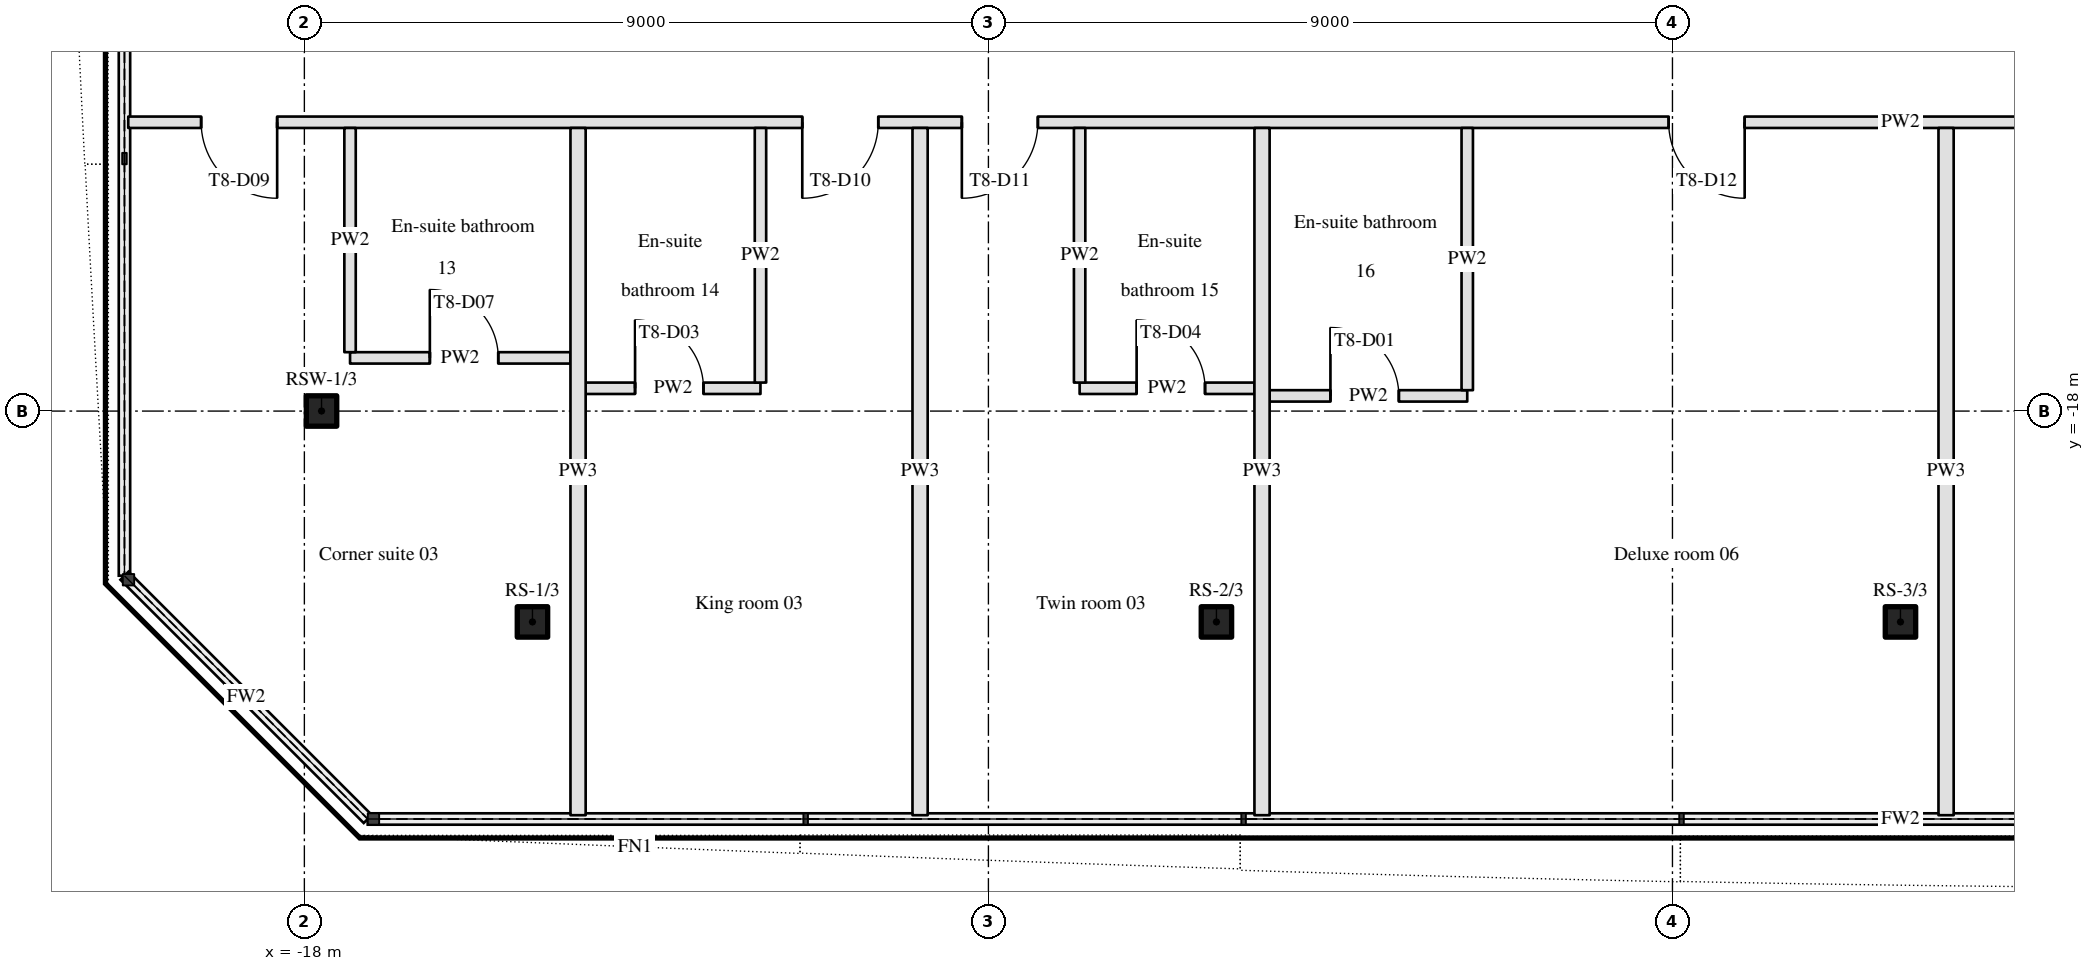
"""IFC4 building model, lengths in metres.
Left out: names, types, materials, properties, quantities, classifications, styles, units other than length and angle.
Written with IfcOpenShell. Run it as: python <this file> out.ifc"""

import sys

from ifc_helpers import new_model, si_unit, direction, frame, frame_2d, origin, origin_2d, place, context, subcontext, project, spatial, rectangle, hollow_rectangle, extrude, element, fill, save


model = new_model("IFC4")
c1 = context("Model", 3, precision=1e-05, world=origin(), true_north=direction((0.0, 1.0)))
c2 = subcontext(c1, "Body", "Model", "MODEL_VIEW")
j1 = project(units=[si_unit("LENGTHUNIT", "METRE"), si_unit("PLANEANGLEUNIT", "RADIAN")], contexts=[c1])
p1 = place(None, origin())
s1 = spatial("IfcSite", under=j1, at=p1, CompositionType="ELEMENT")
p2 = place(p1, origin())
s2 = spatial("IfcBuilding", under=s1, at=p2, CompositionType="ELEMENT")
p3 = place(p2, frame((0.0, 0.0, 121.5)))
s3 = spatial("IfcBuildingStorey", under=s2, at=p3, CompositionType="ELEMENT", Elevation=121.5)
for number, where, z_axis, x_axis in (
    (1, (-14.999, -20.774, 0.0), (0.0, 0.0, 1.0), (1.0, 0.0, 0.0)),
    (2, (-6.0, -20.774, 0.0), (0.0, 0.0, 1.0), (1.0, 0.0, 0.0)),
    (3, (3.0, -20.774, 0.0), (0.0, 0.0, 1.0), (1.0, 0.0, 0.0)),
    (4, (-17.774, -17.999, 0.0), (0.0, 0.0, 1.0), (1.0, 0.0, 0.0)),
):
    element("IfcColumn", number, at=place(p3, frame(where, z_axis=z_axis, x_axis=x_axis)), inside=s3, PredefinedType="COLUMN", context=c2, shape_type="SweptSolid", body=[
        extrude(hollow_rectangle(XDim=0.4, YDim=0.4, WallThickness=0.02, InnerFilletRadius=0.03, OuterFilletRadius=0.05, at=origin_2d()), origin(), (0.0, 0.0, 1.0), 3.4),
    ])
p4 = place(p3, frame((-5.3, -17.8, 0.0), z_axis=(0.0, 0.0, 1.0), x_axis=(1.0, 0.0, 0.0)))
e5 = element("IfcWall", 5, at=p4, inside=s3, PredefinedType="PARTITIONING", context=c2, shape_type="SweptSolid", body=[
    extrude(rectangle(XDim=2.6, YDim=0.15, at=frame_2d((1.3, 0.0))), origin(), (0.0, 0.0, 1.0), 2.46),
])
p5 = place(p4, frame((0.8, 0.0, 0.0)))
e6 = element("IfcOpeningElement", 6, at=p5, cuts=e5, PredefinedType="OPENING", context=c2, shape_type="SweptSolid", body=[
    extrude(rectangle(XDim=0.9, YDim=2.1, at=frame_2d((0.45, 1.05))), frame((0.0, 0.085, 0.0), z_axis=(0.0, -1.0, 0.0), x_axis=(1.0, 0.0, 0.0)), (0.0, 0.0, 1.0), 0.17),
])
p6 = place(p3, frame((-14.299, -17.7, 0.0), z_axis=(0.0, 0.0, 1.0), x_axis=(1.0, 0.0, 0.0)))
e7 = element("IfcWall", 7, at=p6, inside=s3, PredefinedType="PARTITIONING", context=c2, shape_type="SweptSolid", body=[
    extrude(rectangle(XDim=2.3, YDim=0.15, at=frame_2d((1.15, 0.0))), origin(), (0.0, 0.0, 1.0), 2.46),
])
p7 = place(p6, frame((0.65, 0.0, 0.0)))
e8 = element("IfcOpeningElement", 8, at=p7, cuts=e7, PredefinedType="OPENING", context=c2, shape_type="SweptSolid", body=[
    extrude(rectangle(XDim=0.9, YDim=2.1, at=frame_2d((0.45, 1.05))), frame((0.0, 0.085, 0.0), z_axis=(0.0, -1.0, 0.0), x_axis=(1.0, 0.0, 0.0)), (0.0, 0.0, 1.0), 0.17),
])
p8 = place(p3, frame((-7.8, -17.7, 0.0), z_axis=(0.0, 0.0, 1.0), x_axis=(1.0, 0.0, 0.0)))
e9 = element("IfcWall", 9, at=p8, inside=s3, PredefinedType="PARTITIONING", context=c2, shape_type="SweptSolid", body=[
    extrude(rectangle(XDim=2.3, YDim=0.15, at=frame_2d((1.15, 0.0))), origin(), (0.0, 0.0, 1.0), 2.46),
])
p9 = place(p8, frame((0.75, 0.0, 0.0)))
e10 = element("IfcOpeningElement", 10, at=p9, cuts=e9, PredefinedType="OPENING", context=c2, shape_type="SweptSolid", body=[
    extrude(rectangle(XDim=0.9, YDim=2.1, at=frame_2d((0.45, 1.05))), frame((0.0, 0.085, 0.0), z_axis=(0.0, -1.0, 0.0), x_axis=(1.0, 0.0, 0.0)), (0.0, 0.0, 1.0), 0.17),
])
p10 = place(p3, frame((-17.399, -17.3, 0.0), z_axis=(0.0, 0.0, 1.0), x_axis=(1.0, 0.0, 0.0)))
e11 = element("IfcWall", 11, at=p10, inside=s3, PredefinedType="PARTITIONING", context=c2, shape_type="SweptSolid", body=[
    extrude(rectangle(XDim=2.9, YDim=0.15, at=frame_2d((1.45, 0.0))), origin(), (0.0, 0.0, 1.0), 2.46),
])
p11 = place(p10, frame((1.05, 0.0, 0.0)))
e12 = element("IfcOpeningElement", 12, at=p11, cuts=e11, PredefinedType="OPENING", context=c2, shape_type="SweptSolid", body=[
    extrude(rectangle(XDim=0.9, YDim=2.1, at=frame_2d((0.45, 1.05))), frame((0.0, 0.085, 0.0), z_axis=(0.0, -1.0, 0.0), x_axis=(1.0, 0.0, 0.0)), (0.0, 0.0, 1.0), 0.17),
])
p12 = place(p3, frame((26.317, -14.2, 0.0), z_axis=(0.0, 0.0, 1.0), x_axis=(-1.0, 0.0, 0.0)))
e13 = element("IfcWall", 13, at=p12, inside=s3, PredefinedType="PARTITIONING", context=c2, shape_type="SweptSolid", body=[
    extrude(rectangle(XDim=46.634, YDim=0.15, at=frame_2d((23.317, 0.0))), origin(), (0.0, 0.0, 1.0), 2.46),
])
p13 = place(p12, frame((44.675, 0.0, 0.0)))
e14 = element("IfcOpeningElement", 14, at=p13, cuts=e13, PredefinedType="OPENING", context=c2, shape_type="SweptSolid", body=[
    extrude(rectangle(XDim=1.0, YDim=2.1, at=frame_2d((0.5, 1.05))), frame((0.0, 0.085, 0.0), z_axis=(0.0, -1.0, 0.0), x_axis=(1.0, 0.0, 0.0)), (0.0, 0.0, 1.0), 0.17),
])
p14 = place(p12, frame((36.766, 0.0, 0.0)))
e15 = element("IfcOpeningElement", 15, at=p14, cuts=e13, PredefinedType="OPENING", context=c2, shape_type="SweptSolid", body=[
    extrude(rectangle(XDim=1.0, YDim=2.1, at=frame_2d((0.5, 1.05))), frame((0.0, 0.085, 0.0), z_axis=(0.0, -1.0, 0.0), x_axis=(1.0, 0.0, 0.0)), (0.0, 0.0, 1.0), 0.17),
])
p15 = place(p12, frame((34.667, 0.0, 0.0)))
e16 = element("IfcOpeningElement", 16, at=p15, cuts=e13, PredefinedType="OPENING", context=c2, shape_type="SweptSolid", body=[
    extrude(rectangle(XDim=1.0, YDim=2.1, at=frame_2d((0.5, 1.05))), frame((0.0, 0.085, 0.0), z_axis=(0.0, -1.0, 0.0), x_axis=(1.0, 0.0, 0.0)), (0.0, 0.0, 1.0), 0.17),
])
p16 = place(p12, frame((25.367, 0.0, 0.0)))
e17 = element("IfcOpeningElement", 17, at=p16, cuts=e13, PredefinedType="OPENING", context=c2, shape_type="SweptSolid", body=[
    extrude(rectangle(XDim=1.0, YDim=2.1, at=frame_2d((0.5, 1.05))), frame((0.0, 0.085, 0.0), z_axis=(0.0, -1.0, 0.0), x_axis=(1.0, 0.0, 0.0)), (0.0, 0.0, 1.0), 0.17),
])
p17 = place(p12, frame((19.067, 0.0, 0.0)))
e18 = element("IfcOpeningElement", 18, at=p17, cuts=e13, PredefinedType="OPENING", context=c2, shape_type="SweptSolid", body=[
    extrude(rectangle(XDim=1.0, YDim=2.1, at=frame_2d((0.5, 1.05))), frame((0.0, 0.085, 0.0), z_axis=(0.0, -1.0, 0.0), x_axis=(1.0, 0.0, 0.0)), (0.0, 0.0, 1.0), 0.17),
])
p18 = place(p12, frame((9.768, 0.0, 0.0)))
e19 = element("IfcOpeningElement", 19, at=p18, cuts=e13, PredefinedType="OPENING", context=c2, shape_type="SweptSolid", body=[
    extrude(rectangle(XDim=1.0, YDim=2.1, at=frame_2d((0.5, 1.05))), frame((0.0, 0.085, 0.0), z_axis=(0.0, -1.0, 0.0), x_axis=(1.0, 0.0, 0.0)), (0.0, 0.0, 1.0), 0.17),
])
p19 = place(p12, frame((7.668, 0.0, 0.0)))
e20 = element("IfcOpeningElement", 20, at=p19, cuts=e13, PredefinedType="OPENING", context=c2, shape_type="SweptSolid", body=[
    extrude(rectangle(XDim=1.0, YDim=2.1, at=frame_2d((0.5, 1.05))), frame((0.0, 0.085, 0.0), z_axis=(0.0, -1.0, 0.0), x_axis=(1.0, 0.0, 0.0)), (0.0, 0.0, 1.0), 0.17),
])
p20 = place(p12, frame((0.359, 0.0, 0.0)))
e21 = element("IfcOpeningElement", 21, at=p20, cuts=e13, PredefinedType="OPENING", context=c2, shape_type="SweptSolid", body=[
    extrude(rectangle(XDim=1.0, YDim=2.1, at=frame_2d((0.5, 1.05))), frame((0.0, 0.085, 0.0), z_axis=(0.0, -1.0, 0.0), x_axis=(1.0, 0.0, 0.0)), (0.0, 0.0, 1.0), 0.17),
])
p21 = place(p3, frame((-17.399, -17.225, 0.0), z_axis=(0.0, 0.0, 1.0), x_axis=(0.0, 1.0, 0.0)))
e22 = element("IfcWall", 22, at=p21, inside=s3, PredefinedType="PARTITIONING", context=c2, shape_type="SweptSolid", body=[
    extrude(rectangle(XDim=2.95, YDim=0.15, at=frame_2d((1.475, 0.0))), origin(), (0.0, 0.0, 1.0), 2.46),
])
p22 = place(p3, frame((-14.399, -23.317, 0.0), z_axis=(0.0, 0.0, 1.0), x_axis=(0.0, 1.0, 0.0)))
e23 = element("IfcWall", 23, at=p22, inside=s3, PredefinedType="PARTITIONING", context=c2, shape_type="SweptSolid", body=[
    extrude(rectangle(XDim=9.042, YDim=0.2, at=frame_2d((4.521, 0.0))), origin(), (0.0, 0.0, 1.0), 2.46),
])
p23 = place(p3, frame((-11.999, -17.625, 0.0), z_axis=(0.0, 0.0, 1.0), x_axis=(0.0, 1.0, 0.0)))
e24 = element("IfcWall", 24, at=p23, inside=s3, PredefinedType="PARTITIONING", context=c2, shape_type="SweptSolid", body=[
    extrude(rectangle(XDim=3.35, YDim=0.15, at=frame_2d((1.675, 0.0))), origin(), (0.0, 0.0, 1.0), 2.46),
])
p24 = place(p3, frame((-9.899, -23.317, 0.0), z_axis=(0.0, 0.0, 1.0), x_axis=(0.0, 1.0, 0.0)))
e25 = element("IfcWall", 25, at=p24, inside=s3, PredefinedType="PARTITIONING", context=c2, shape_type="SweptSolid", body=[
    extrude(rectangle(XDim=9.042, YDim=0.2, at=frame_2d((4.521, 0.0))), origin(), (0.0, 0.0, 1.0), 2.46),
])
p25 = place(p3, frame((-7.8, -17.625, 0.0), z_axis=(0.0, 0.0, 1.0), x_axis=(0.0, 1.0, 0.0)))
e26 = element("IfcWall", 26, at=p25, inside=s3, PredefinedType="PARTITIONING", context=c2, shape_type="SweptSolid", body=[
    extrude(rectangle(XDim=3.35, YDim=0.15, at=frame_2d((1.675, 0.0))), origin(), (0.0, 0.0, 1.0), 2.46),
])
p26 = place(p3, frame((-5.4, -23.317, 0.0), z_axis=(0.0, 0.0, 1.0), x_axis=(0.0, 1.0, 0.0)))
e27 = element("IfcWall", 27, at=p26, inside=s3, PredefinedType="PARTITIONING", context=c2, shape_type="SweptSolid", body=[
    extrude(rectangle(XDim=9.042, YDim=0.2, at=frame_2d((4.521, 0.0))), origin(), (0.0, 0.0, 1.0), 2.46),
])
p27 = place(p3, frame((-2.7, -17.725, 0.0), z_axis=(0.0, 0.0, 1.0), x_axis=(0.0, 1.0, 0.0)))
e28 = element("IfcWall", 28, at=p27, inside=s3, PredefinedType="PARTITIONING", context=c2, shape_type="SweptSolid", body=[
    extrude(rectangle(XDim=3.45, YDim=0.15, at=frame_2d((1.725, 0.0))), origin(), (0.0, 0.0, 1.0), 2.46),
])
p28 = place(p3, frame((3.6, -23.317, 0.0), z_axis=(0.0, 0.0, 1.0), x_axis=(0.0, 1.0, 0.0)))
e29 = element("IfcWall", 29, at=p28, inside=s3, PredefinedType="PARTITIONING", context=c2, shape_type="SweptSolid", body=[
    extrude(rectangle(XDim=9.042, YDim=0.2, at=frame_2d((4.521, 0.0))), origin(), (0.0, 0.0, 1.0), 2.46),
])
p29 = place(p13, origin())
e30 = element("IfcDoor", 30, at=p29, inside=s3, OperationType="SINGLE_SWING_LEFT", PredefinedType="DOOR", context=c2, shape_type="SweptSolid", body=[
    extrude(rectangle(XDim=1.0, YDim=2.1, at=frame_2d((0.5, 1.05))), frame((0.0, 0.025, 0.0), z_axis=(0.0, -1.0, 0.0), x_axis=(1.0, 0.0, 0.0)), (0.0, 0.0, 1.0), 0.05),
])
fill(e14, e30)
p30 = place(p14, origin())
e31 = element("IfcDoor", 31, at=p30, inside=s3, OperationType="SINGLE_SWING_RIGHT", PredefinedType="DOOR", context=c2, shape_type="SweptSolid", body=[
    extrude(rectangle(XDim=1.0, YDim=2.1, at=frame_2d((0.5, 1.05))), frame((0.0, 0.025, 0.0), z_axis=(0.0, -1.0, 0.0), x_axis=(1.0, 0.0, 0.0)), (0.0, 0.0, 1.0), 0.05),
])
fill(e15, e31)
p31 = place(p15, origin())
e32 = element("IfcDoor", 32, at=p31, inside=s3, OperationType="SINGLE_SWING_RIGHT", PredefinedType="DOOR", context=c2, shape_type="SweptSolid", body=[
    extrude(rectangle(XDim=1.0, YDim=2.1, at=frame_2d((0.5, 1.05))), frame((0.0, 0.025, 0.0), z_axis=(0.0, -1.0, 0.0), x_axis=(1.0, 0.0, 0.0)), (0.0, 0.0, 1.0), 0.05),
])
fill(e16, e32)
p32 = place(p16, origin())
e33 = element("IfcDoor", 33, at=p32, inside=s3, OperationType="SINGLE_SWING_LEFT", PredefinedType="DOOR", context=c2, shape_type="SweptSolid", body=[
    extrude(rectangle(XDim=1.0, YDim=2.1, at=frame_2d((0.5, 1.05))), frame((0.0, 0.025, 0.0), z_axis=(0.0, -1.0, 0.0), x_axis=(1.0, 0.0, 0.0)), (0.0, 0.0, 1.0), 0.05),
])
fill(e17, e33)
p33 = place(p11, origin())
e34 = element("IfcDoor", 34, at=p33, inside=s3, OperationType="SINGLE_SWING_LEFT", PredefinedType="DOOR", context=c2, shape_type="SweptSolid", body=[
    extrude(rectangle(XDim=0.9, YDim=2.1, at=frame_2d((0.45, 1.05))), frame((0.0, 0.025, 0.0), z_axis=(0.0, -1.0, 0.0), x_axis=(1.0, 0.0, 0.0)), (0.0, 0.0, 1.0), 0.05),
])
fill(e12, e34)
p34 = place(p7, origin())
e35 = element("IfcDoor", 35, at=p34, inside=s3, OperationType="SINGLE_SWING_LEFT", PredefinedType="DOOR", context=c2, shape_type="SweptSolid", body=[
    extrude(rectangle(XDim=0.9, YDim=2.1, at=frame_2d((0.45, 1.05))), frame((0.0, 0.025, 0.0), z_axis=(0.0, -1.0, 0.0), x_axis=(1.0, 0.0, 0.0)), (0.0, 0.0, 1.0), 0.05),
])
fill(e8, e35)
p35 = place(p9, origin())
e36 = element("IfcDoor", 36, at=p35, inside=s3, OperationType="SINGLE_SWING_LEFT", PredefinedType="DOOR", context=c2, shape_type="SweptSolid", body=[
    extrude(rectangle(XDim=0.9, YDim=2.1, at=frame_2d((0.45, 1.05))), frame((0.0, 0.025, 0.0), z_axis=(0.0, -1.0, 0.0), x_axis=(1.0, 0.0, 0.0)), (0.0, 0.0, 1.0), 0.05),
])
fill(e10, e36)
p36 = place(p5, origin())
e37 = element("IfcDoor", 37, at=p36, inside=s3, OperationType="SINGLE_SWING_LEFT", PredefinedType="DOOR", context=c2, shape_type="SweptSolid", body=[
    extrude(rectangle(XDim=0.9, YDim=2.1, at=frame_2d((0.45, 1.05))), frame((0.0, 0.025, 0.0), z_axis=(0.0, -1.0, 0.0), x_axis=(1.0, 0.0, 0.0)), (0.0, 0.0, 1.0), 0.05),
])
fill(e6, e37)
save(model, sys.argv[1])
